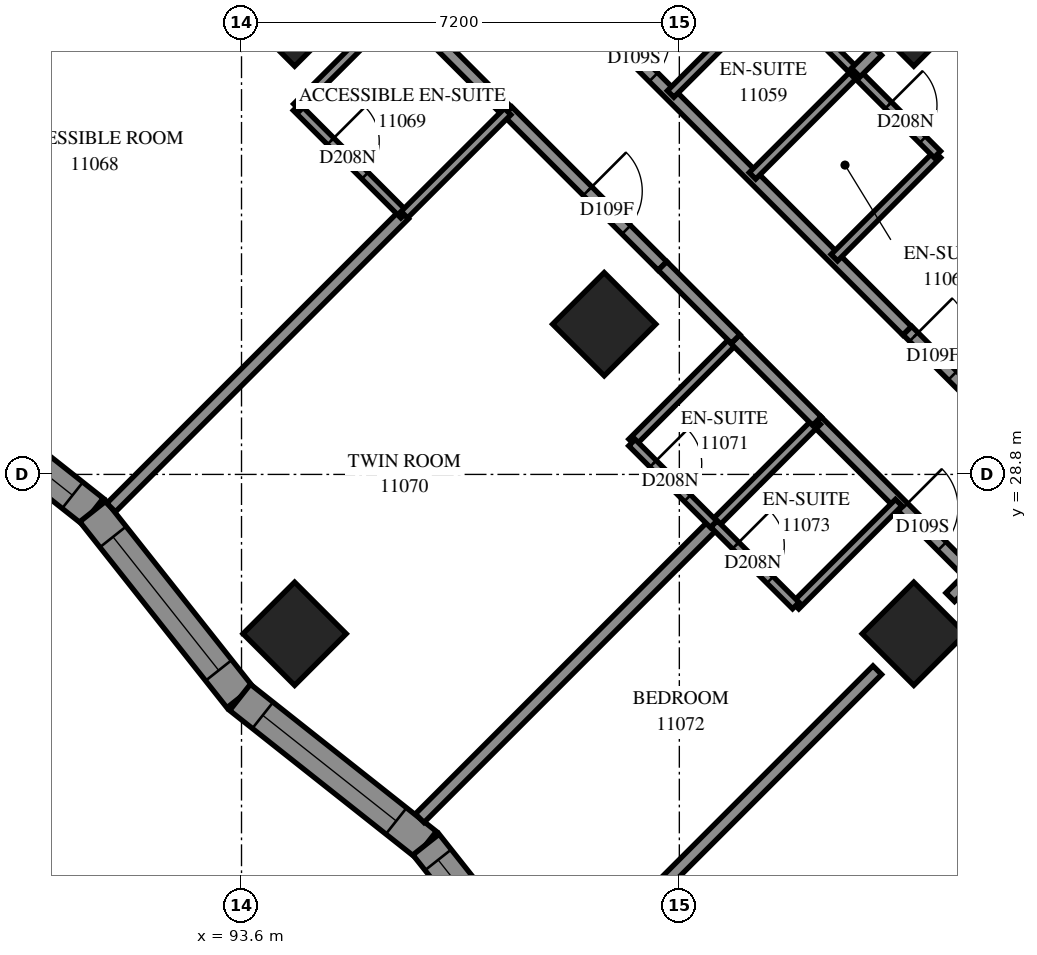
"""IFC4 building model, lengths in metres.
Left out: names, types, materials, properties, quantities, classifications, styles, units other than length and angle.
Written with IfcOpenShell. Run it as: python <this file> out.ifc"""

import sys

from ifc_helpers import new_model, si_unit, direction, frame, frame_2d, origin, origin_2d, place, context, subcontext, project, spatial, polyline, rectangle, outline, extrude, element, fill, save


model = new_model("IFC4")
c1 = context("Model", 3, precision=1e-05, world=origin(), true_north=direction((0.0, 1.0)))
c2 = subcontext(c1, "Body", "Model", "MODEL_VIEW")
j1 = project(units=[si_unit("LENGTHUNIT", "METRE"), si_unit("PLANEANGLEUNIT", "RADIAN")], contexts=[c1])
p1 = place(None, origin())
s1 = spatial("IfcSite", under=j1, at=p1, CompositionType="ELEMENT")
p2 = place(p1, origin())
s2 = spatial("IfcBuilding", under=s1, at=p2, CompositionType="ELEMENT")
p3 = place(p2, frame((0.0, 0.0, 44.0)))
s3 = spatial("IfcBuildingStorey", under=s2, at=p3, CompositionType="ELEMENT", Elevation=44.0)
for number, where, z_axis, x_axis in (
    (1, (94.474, 36.362, 0.0), (0.0, 0.0, 1.0), (0.707, -0.707, 0.0)),
    (2, (104.656, 36.362, 0.0), (0.0, 0.0, 1.0), (0.707, -0.707, 0.0)),
    (3, (99.565, 31.271, 0.0), (0.0, 0.0, 1.0), (0.707, -0.707, 0.0)),
    (4, (94.474, 26.18, 0.0), (0.0, 0.0, 1.0), (0.707, -0.707, 0.0)),
    (5, (104.656, 26.18, 0.0), (0.0, 0.0, 1.0), (0.707, -0.707, 0.0)),
):
    element("IfcColumn", number, at=place(p3, frame(where, z_axis=z_axis, x_axis=x_axis)), inside=s3, PredefinedType="COLUMN", context=c2, shape_type="SweptSolid", body=[
        extrude(rectangle(XDim=1.2, YDim=1.2, at=origin_2d()), origin(), (0.0, 0.0, 1.0), 3.1),
    ])
p4 = place(p3, frame((88.097, 30.612, 0.0), z_axis=(0.0, 0.0, 1.0), x_axis=(0.7841326465, -0.6205932587, 0.0)))
e6 = element("IfcWall", 6, at=p4, inside=s3, PredefinedType="SOLIDWALL", context=c2, shape_type="SweptSolid", body=[
    extrude(outline(polyline([(-0.032, -0.275), (3.868, -0.275), (3.932, 0.275), (0.032, 0.275), (-0.032, -0.275)])), origin(), (0.0, 0.0, 1.0), 3.1),
])
p5 = place(p4, frame((0.673, 0.0, 0.5)))
e7 = element("IfcOpeningElement", 7, at=p5, cuts=e6, PredefinedType="OPENING", context=c2, shape_type="SweptSolid", body=[
    extrude(rectangle(XDim=2.8, YDim=2.45, at=frame_2d((1.4, 1.225))), frame((0.0, 0.285, 0.0), z_axis=(0.0, -1.0, 0.0), x_axis=(1.0, 0.0, 0.0)), (0.0, 0.0, 1.0), 0.57),
])
p6 = place(p3, frame((91.156, 28.192, 0.0), z_axis=(0.0, 0.0, 1.0), x_axis=(0.6205932587, -0.7841326465, 0.0)))
e8 = element("IfcWall", 8, at=p6, inside=s3, PredefinedType="SOLIDWALL", context=c2, shape_type="SweptSolid", body=[
    extrude(outline(polyline([(0.032, -0.275), (3.932, -0.275), (3.868, 0.275), (-0.032, 0.275), (0.032, -0.275)])), origin(), (0.0, 0.0, 1.0), 3.1),
])
p7 = place(p6, frame((0.534, 0.0, 0.5)))
e9 = element("IfcOpeningElement", 9, at=p7, cuts=e8, PredefinedType="OPENING", context=c2, shape_type="SweptSolid", body=[
    extrude(rectangle(XDim=2.8, YDim=2.45, at=frame_2d((1.4, 1.225))), frame((0.0, 0.285, 0.0), z_axis=(0.0, -1.0, 0.0), x_axis=(1.0, 0.0, 0.0)), (0.0, 0.0, 1.0), 0.57),
])
p8 = place(p3, frame((93.576, 25.134, 0.0), z_axis=(0.0, 0.0, 1.0), x_axis=(0.7841326465, -0.6205932587, 0.0)))
e10 = element("IfcWall", 10, at=p8, inside=s3, PredefinedType="SOLIDWALL", context=c2, shape_type="SweptSolid", body=[
    extrude(outline(polyline([(-0.032, -0.275), (3.868, -0.275), (3.932, 0.275), (0.032, 0.275), (-0.032, -0.275)])), origin(), (0.0, 0.0, 1.0), 3.1),
])
p9 = place(p8, frame((0.475, 0.0, 0.5)))
e11 = element("IfcOpeningElement", 11, at=p9, cuts=e10, PredefinedType="OPENING", context=c2, shape_type="SweptSolid", body=[
    extrude(rectangle(XDim=2.8, YDim=2.45, at=frame_2d((1.4, 1.225))), frame((0.0, 0.285, 0.0), z_axis=(0.0, -1.0, 0.0), x_axis=(1.0, 0.0, 0.0)), (0.0, 0.0, 1.0), 0.57),
])
p10 = place(p3, frame((96.634, 22.713, 0.0), z_axis=(0.0, 0.0, 1.0), x_axis=(0.6205932587, -0.7841326465, 0.0)))
e12 = element("IfcWall", 12, at=p10, inside=s3, PredefinedType="SOLIDWALL", context=c2, shape_type="SweptSolid", body=[
    extrude(outline(polyline([(0.032, -0.275), (3.932, -0.275), (3.868, 0.275), (-0.032, 0.275), (0.032, -0.275)])), origin(), (0.0, 0.0, 1.0), 3.1),
])
p11 = place(p10, frame((0.322, 0.0, 0.5)))
e13 = element("IfcOpeningElement", 13, at=p11, cuts=e12, PredefinedType="OPENING", context=c2, shape_type="SweptSolid", body=[
    extrude(rectangle(XDim=2.8, YDim=2.45, at=frame_2d((1.4, 1.225))), frame((0.0, 0.285, 0.0), z_axis=(0.0, -1.0, 0.0), x_axis=(1.0, 0.0, 0.0)), (0.0, 0.0, 1.0), 0.57),
])
p12 = place(p3, frame((103.061, 29.677, 0.0), z_axis=(0.0, 0.0, 1.0), x_axis=(0.7071067812, -0.7071067812, 0.0)))
e14 = element("IfcWall", 14, at=p12, inside=s3, PredefinedType="PARTITIONING", context=c2, shape_type="SweptSolid", body=[
    extrude(rectangle(XDim=10.802, YDim=0.2, at=frame_2d((5.401, 0.0))), origin(), (0.0, 0.0, 1.0), 3.1),
])
p13 = place(p12, frame((2.012, 0.0, 0.0)))
e15 = element("IfcOpeningElement", 15, at=p13, cuts=e14, PredefinedType="OPENING", context=c2, shape_type="SweptSolid", body=[
    extrude(rectangle(XDim=0.9, YDim=2.1, at=frame_2d((0.45, 1.05))), frame((0.0, 0.11, 0.0), z_axis=(0.0, -1.0, 0.0), x_axis=(1.0, 0.0, 0.0)), (0.0, 0.0, 1.0), 0.22),
])
p14 = place(p12, frame((7.463, 0.0, 0.0)))
e16 = element("IfcOpeningElement", 16, at=p14, cuts=e14, PredefinedType="OPENING", context=c2, shape_type="SweptSolid", body=[
    extrude(rectangle(XDim=1.0, YDim=2.1, at=frame_2d((0.5, 1.05))), frame((0.0, 0.11, 0.0), z_axis=(0.0, -1.0, 0.0), x_axis=(1.0, 0.0, 0.0)), (0.0, 0.0, 1.0), 0.22),
])
p15 = place(p3, frame((86.324, 33.296, 0.0), z_axis=(0.0, 0.0, 1.0), x_axis=(0.7069990152, 0.7072145308, 0.0)))
e17 = element("IfcWall", 17, at=p15, inside=s3, PredefinedType="PARTITIONING", context=c2, shape_type="SweptSolid", body=[
    extrude(rectangle(XDim=9.28, YDim=0.2, at=frame_2d((4.64, 0.0))), origin(), (0.0, 0.0, 1.0), 3.1),
])
p16 = place(p3, frame((92.243, 40.495, 0.0), z_axis=(0.0, 0.0, 1.0), x_axis=(0.7071067812, -0.7071067812, 0.0)))
e18 = element("IfcWall", 18, at=p16, inside=s3, PredefinedType="PARTITIONING", context=c2, shape_type="SweptSolid", body=[
    extrude(rectangle(XDim=8.101, YDim=0.2, at=frame_2d((4.05, 0.0))), origin(), (0.0, 0.0, 1.0), 3.1),
])
p17 = place(p16, frame((2.75, 0.0, 0.0)))
e19 = element("IfcOpeningElement", 19, at=p17, cuts=e18, PredefinedType="OPENING", context=c2, shape_type="SweptSolid", body=[
    extrude(rectangle(XDim=0.9, YDim=2.1, at=frame_2d((0.45, 1.05))), frame((0.0, 0.11, 0.0), z_axis=(0.0, -1.0, 0.0), x_axis=(1.0, 0.0, 0.0)), (0.0, 0.0, 1.0), 0.22),
])
p18 = place(p3, frame((86.836, 35.372, 0.0), z_axis=(0.0, 0.0, 1.0), x_axis=(0.7071067812, 0.7071067812, 0.0)))
e20 = element("IfcWall", 20, at=p18, inside=s3, PredefinedType="PARTITIONING", context=c2, shape_type="SweptSolid", body=[
    extrude(rectangle(XDim=7.45, YDim=0.2, at=frame_2d((3.725, 0.0))), origin(), (0.0, 0.0, 1.0), 3.1),
])
p19 = place(p18, frame((6.192, 0.0, 0.0)))
e21 = element("IfcOpeningElement", 21, at=p19, cuts=e20, PredefinedType="OPENING", context=c2, shape_type="SweptSolid", body=[
    extrude(rectangle(XDim=1.0, YDim=2.1, at=frame_2d((0.5, 1.05))), frame((0.0, 0.11, 0.0), z_axis=(0.0, -1.0, 0.0), x_axis=(1.0, 0.0, 0.0)), (0.0, 0.0, 1.0), 0.22),
])
p20 = place(p3, frame((99.455, 36.253, 0.0), z_axis=(0.0, 0.0, 1.0), x_axis=(0.7071067812, -0.7071067812, 0.0)))
e22 = element("IfcWall", 22, at=p20, inside=s3, PredefinedType="PARTITIONING", context=c2, shape_type="SweptSolid", body=[
    extrude(rectangle(XDim=7.201, YDim=0.2, at=frame_2d((3.601, 0.0))), origin(), (0.0, 0.0, 1.0), 3.1),
])
p21 = place(p20, frame((0.401, 0.0, 0.0)))
e23 = element("IfcOpeningElement", 23, at=p21, cuts=e22, PredefinedType="OPENING", context=c2, shape_type="SweptSolid", body=[
    extrude(rectangle(XDim=0.9, YDim=2.1, at=frame_2d((0.45, 1.05))), frame((0.0, 0.11, 0.0), z_axis=(0.0, -1.0, 0.0), x_axis=(1.0, 0.0, 0.0)), (0.0, 0.0, 1.0), 0.22),
])
p22 = place(p3, frame((96.53, 23.146, 0.0), z_axis=(0.0, 0.0, 1.0), x_axis=(0.7071140909, 0.7070994714, 0.0)))
e24 = element("IfcWall", 24, at=p22, inside=s3, PredefinedType="PARTITIONING", context=c2, shape_type="SweptSolid", body=[
    extrude(rectangle(XDim=6.84, YDim=0.2, at=frame_2d((3.42, 0.0))), origin(), (0.0, 0.0, 1.0), 3.1),
])
p23 = place(p3, frame((91.456, 28.255, 0.0), z_axis=(0.0, 0.0, 1.0), x_axis=(0.7071067812, 0.7071067812, 0.0)))
e25 = element("IfcWall", 25, at=p23, inside=s3, PredefinedType="PARTITIONING", context=c2, shape_type="SweptSolid", body=[
    extrude(rectangle(XDim=6.816, YDim=0.2, at=frame_2d((3.408, 0.0))), origin(), (0.0, 0.0, 1.0), 3.1),
])
p24 = place(p3, frame((100.163, 21.689, 0.0), z_axis=(0.0, 0.0, 1.0), x_axis=(0.7071067812, 0.7071067812, 0.0)))
e26 = element("IfcWall", 26, at=p24, inside=s3, PredefinedType="PARTITIONING", context=c2, shape_type="SweptSolid", body=[
    extrude(rectangle(XDim=5.504, YDim=0.2, at=frame_2d((2.752, 0.0))), origin(), (0.0, 0.0, 1.0), 3.1),
])
p25 = place(p3, frame((97.976, 34.772, 0.0), z_axis=(0.0, 0.0, 1.0), x_axis=(0.7073845681, -0.7068288851, 0.0)))
e27 = element("IfcWall", 27, at=p25, inside=s3, PredefinedType="PARTITIONING", context=c2, shape_type="SweptSolid", body=[
    extrude(rectangle(XDim=3.599, YDim=0.2, at=frame_2d((1.8, 0.0))), origin(), (0.0, 0.0, 1.0), 3.1),
])
p26 = place(p25, frame((1.858, 0.0, 0.0)))
e28 = element("IfcOpeningElement", 28, at=p26, cuts=e27, PredefinedType="OPENING", context=c2, shape_type="SweptSolid", body=[
    extrude(rectangle(XDim=0.9, YDim=2.1, at=frame_2d((0.45, 1.05))), frame((0.0, 0.11, 0.0), z_axis=(0.0, -1.0, 0.0), x_axis=(1.0, 0.0, 0.0)), (0.0, 0.0, 1.0), 0.22),
])
p27 = place(p3, frame((104.551, 31.165, 0.0), z_axis=(0.0, 0.0, 1.0), x_axis=(0.7074545101, -0.7067588812, 0.0)))
e29 = element("IfcWall", 29, at=p27, inside=s3, PredefinedType="PARTITIONING", context=c2, shape_type="SweptSolid", body=[
    extrude(rectangle(XDim=2.875, YDim=0.2, at=frame_2d((1.438, 0.0))), origin(), (0.0, 0.0, 1.0), 3.1),
])
p28 = place(p27, frame((0.148, 0.0, 0.0)))
e30 = element("IfcOpeningElement", 30, at=p28, cuts=e29, PredefinedType="OPENING", context=c2, shape_type="SweptSolid", body=[
    extrude(rectangle(XDim=0.9, YDim=2.1, at=frame_2d((0.45, 1.05))), frame((0.0, 0.11, 0.0), z_axis=(0.0, -1.0, 0.0), x_axis=(1.0, 0.0, 0.0)), (0.0, 0.0, 1.0), 0.22),
])
p29 = place(p3, frame((94.505, 34.839, 0.0), z_axis=(0.0, 0.0, 1.0), x_axis=(0.7071067812, -0.7071067812, 0.0)))
e31 = element("IfcWall", 31, at=p29, inside=s3, PredefinedType="PARTITIONING", context=c2, shape_type="SweptSolid", body=[
    extrude(rectangle(XDim=2.5, YDim=0.15, at=frame_2d((1.25, 0.0))), origin(), (0.0, 0.0, 1.0), 3.1),
])
p30 = place(p29, frame((0.792, 0.0, 0.0)))
e32 = element("IfcOpeningElement", 32, at=p30, cuts=e31, PredefinedType="OPENING", context=c2, shape_type="SweptSolid", body=[
    extrude(rectangle(XDim=0.8, YDim=2.1, at=frame_2d((0.4, 1.05))), frame((0.0, 0.085, 0.0), z_axis=(0.0, -1.0, 0.0), x_axis=(1.0, 0.0, 0.0)), (0.0, 0.0, 1.0), 0.17),
])
for number, where, z_axis, x_axis in (
    (33, (102.003, 33.711, 0.0), (0.0, 0.0, 1.0), (0.707, 0.707, 0.0)),
    (34, (100.023, 29.327, 0.0), (0.0, 0.0, 1.0), (0.707, 0.707, 0.0)),
):
    element("IfcWall", number, at=place(p3, frame(where, z_axis=z_axis, x_axis=x_axis)), inside=s3, PredefinedType="PARTITIONING", context=c2, shape_type="SweptSolid", body=[
        extrude(rectangle(XDim=2.401, YDim=0.15, at=frame_2d((1.201, 0.0))), origin(), (0.0, 0.0, 1.0), 3.1),
    ])
for number, where, z_axis, x_axis in (
    (35, (96.278, 33.072, 0.0), (0.0, 0.0, 1.0), (0.708, 0.707, 0.0)),
    (36, (94.511, 34.839, 0.0), (0.0, 0.0, 1.0), (0.708, 0.707, 0.0)),
    (37, (100.657, 35.057, 0.0), (0.0, 0.0, 1.0), (0.708, 0.707, 0.0)),
    (38, (101.371, 27.979, 0.0), (0.0, 0.0, 1.0), (0.707, 0.708, 0.0)),
    (39, (103.349, 32.365, 0.0), (0.0, 0.0, 1.0), (0.707, 0.708, 0.0)),
):
    element("IfcWall", number, at=place(p3, frame(where, z_axis=z_axis, x_axis=x_axis)), inside=s3, PredefinedType="PARTITIONING", context=c2, shape_type="SweptSolid", body=[
        extrude(rectangle(XDim=2.4, YDim=0.15, at=frame_2d((1.2, 0.0))), origin(), (0.0, 0.0, 1.0), 3.1),
    ])
p31 = place(p3, frame((102.711, 26.641, 0.0), z_axis=(0.0, 0.0, 1.0), x_axis=(0.7071067812, 0.7071067812, 0.0)))
e40 = element("IfcWall", 40, at=p31, inside=s3, PredefinedType="PARTITIONING", context=c2, shape_type="SweptSolid", body=[
    extrude(rectangle(XDim=2.398, YDim=0.15, at=frame_2d((1.199, 0.0))), origin(), (0.0, 0.0, 1.0), 3.1),
])
p32 = place(p3, frame((100.021, 29.323, 0.0), z_axis=(0.0, 0.0, 1.0), x_axis=(0.7071067812, -0.7071067812, 0.0)))
e41 = element("IfcWall", 41, at=p32, inside=s3, PredefinedType="PARTITIONING", context=c2, shape_type="SweptSolid", body=[
    extrude(rectangle(XDim=1.901, YDim=0.15, at=frame_2d((0.95, 0.0))), origin(), (0.0, 0.0, 1.0), 3.1),
])
p33 = place(p32, frame((0.491, 0.0, 0.0)))
e42 = element("IfcOpeningElement", 42, at=p33, cuts=e41, PredefinedType="OPENING", context=c2, shape_type="SweptSolid", body=[
    extrude(rectangle(XDim=0.8, YDim=2.1, at=frame_2d((0.4, 1.05))), frame((0.0, 0.085, 0.0), z_axis=(0.0, -1.0, 0.0), x_axis=(1.0, 0.0, 0.0)), (0.0, 0.0, 1.0), 0.17),
])
p34 = place(p3, frame((101.371, 27.985, 0.0), z_axis=(0.0, 0.0, 1.0), x_axis=(0.7076330979, -0.7065800724, 0.0)))
e43 = element("IfcWall", 43, at=p34, inside=s3, PredefinedType="PARTITIONING", context=c2, shape_type="SweptSolid", body=[
    extrude(rectangle(XDim=1.899, YDim=0.15, at=frame_2d((0.95, 0.0))), origin(), (0.0, 0.0, 1.0), 3.1),
])
p35 = place(p34, frame((0.501, 0.0, 0.0)))
e44 = element("IfcOpeningElement", 44, at=p35, cuts=e43, PredefinedType="OPENING", context=c2, shape_type="SweptSolid", body=[
    extrude(rectangle(XDim=0.8, YDim=2.1, at=frame_2d((0.4, 1.05))), frame((0.0, 0.085, 0.0), z_axis=(0.0, -1.0, 0.0), x_axis=(1.0, 0.0, 0.0)), (0.0, 0.0, 1.0), 0.17),
])
p36 = place(p3, frame((103.701, 35.407, 0.0), z_axis=(0.0, 0.0, 1.0), x_axis=(0.7065800724, -0.7076330979, 0.0)))
e45 = element("IfcWall", 45, at=p36, inside=s3, PredefinedType="PARTITIONING", context=c2, shape_type="SweptSolid", body=[
    extrude(rectangle(XDim=1.899, YDim=0.15, at=frame_2d((0.95, 0.0))), origin(), (0.0, 0.0, 1.0), 3.1),
])
p37 = place(p36, frame((0.759, 0.0, 0.0)))
e46 = element("IfcOpeningElement", 46, at=p37, cuts=e45, PredefinedType="OPENING", context=c2, shape_type="SweptSolid", body=[
    extrude(rectangle(XDim=0.8, YDim=2.1, at=frame_2d((0.4, 1.05))), frame((0.0, 0.085, 0.0), z_axis=(0.0, -1.0, 0.0), x_axis=(1.0, 0.0, 0.0)), (0.0, 0.0, 1.0), 0.17),
])
p38 = place(p3, frame((101.72, 31.022, 0.0), z_axis=(0.0, 0.0, 1.0), x_axis=(0.7065800724, -0.7076330979, 0.0)))
e47 = element("IfcWall", 47, at=p38, inside=s3, PredefinedType="PARTITIONING", context=c2, shape_type="SweptSolid", body=[
    extrude(rectangle(XDim=1.899, YDim=0.2, at=frame_2d((0.95, 0.0))), origin(), (0.0, 0.0, 1.0), 3.1),
])
p39 = place(p3, frame((102.358, 36.75, 0.0), z_axis=(0.0, 0.0, 1.0), x_axis=(0.7076330979, -0.7065800724, 0.0)))
e48 = element("IfcWall", 48, at=p39, inside=s3, PredefinedType="PARTITIONING", context=c2, shape_type="SweptSolid", body=[
    extrude(rectangle(XDim=1.899, YDim=0.15, at=frame_2d((0.95, 0.0))), origin(), (0.0, 0.0, 1.0), 3.1),
])
p40 = place(p39, frame((0.296, 0.0, 0.0)))
e49 = element("IfcOpeningElement", 49, at=p40, cuts=e48, PredefinedType="OPENING", context=c2, shape_type="SweptSolid", body=[
    extrude(rectangle(XDim=0.8, YDim=2.1, at=frame_2d((0.4, 1.05))), frame((0.0, 0.085, 0.0), z_axis=(0.0, -1.0, 0.0), x_axis=(1.0, 0.0, 0.0)), (0.0, 0.0, 1.0), 0.17),
])
p41 = place(p3, frame((100.523, 32.229, 0.0), z_axis=(0.0, 0.0, 1.0), x_axis=(0.7071067812, -0.7071067812, 0.0)))
e50 = element("IfcWall", 50, at=p41, inside=s3, PredefinedType="PARTITIONING", context=c2, shape_type="SweptSolid", body=[
    extrude(rectangle(XDim=1.7, YDim=0.2, at=frame_2d((0.85, 0.0))), origin(), (0.0, 0.0, 1.0), 3.1),
])
for number, where, z_axis, x_axis in (
    (51, (105.255, 26.781, 0.0), (0.0, 0.0, 1.0), (0.707, 0.707, 0.0)),
    (52, (103.701, 35.409, 0.0), (0.0, 0.0, 1.0), (0.707, 0.707, 0.0)),
):
    element("IfcWall", number, at=place(p3, frame(where, z_axis=z_axis, x_axis=x_axis)), inside=s3, PredefinedType="PARTITIONING", context=c2, shape_type="SweptSolid", body=[
        extrude(rectangle(XDim=0.501, YDim=0.2, at=frame_2d((0.25, 0.0))), origin(), (0.0, 0.0, 1.0), 3.1),
    ])
p42 = place(p5, origin())
e53 = element("IfcWindow", 53, at=p42, inside=s3, PartitioningType="SINGLE_PANEL", PredefinedType="WINDOW", context=c2, shape_type="SweptSolid", body=[
    extrude(rectangle(XDim=2.8, YDim=2.45, at=frame_2d((1.4, 1.225))), frame((0.0, 0.155, 0.0), z_axis=(0.0, -1.0, 0.0), x_axis=(1.0, 0.0, 0.0)), (0.0, 0.0, 1.0), 0.06),
])
fill(e7, e53)
p43 = place(p7, origin())
e54 = element("IfcWindow", 54, at=p43, inside=s3, PartitioningType="SINGLE_PANEL", PredefinedType="WINDOW", context=c2, shape_type="SweptSolid", body=[
    extrude(rectangle(XDim=2.8, YDim=2.45, at=frame_2d((1.4, 1.225))), frame((0.0, 0.155, 0.0), z_axis=(0.0, -1.0, 0.0), x_axis=(1.0, 0.0, 0.0)), (0.0, 0.0, 1.0), 0.06),
])
fill(e9, e54)
p44 = place(p9, origin())
e55 = element("IfcWindow", 55, at=p44, inside=s3, PartitioningType="SINGLE_PANEL", PredefinedType="WINDOW", context=c2, shape_type="SweptSolid", body=[
    extrude(rectangle(XDim=2.8, YDim=2.45, at=frame_2d((1.4, 1.225))), frame((0.0, 0.155, 0.0), z_axis=(0.0, -1.0, 0.0), x_axis=(1.0, 0.0, 0.0)), (0.0, 0.0, 1.0), 0.06),
])
fill(e11, e55)
p45 = place(p11, origin())
e56 = element("IfcWindow", 56, at=p45, inside=s3, PartitioningType="SINGLE_PANEL", PredefinedType="WINDOW", context=c2, shape_type="SweptSolid", body=[
    extrude(rectangle(XDim=2.8, YDim=2.45, at=frame_2d((1.4, 1.225))), frame((0.0, 0.155, 0.0), z_axis=(0.0, -1.0, 0.0), x_axis=(1.0, 0.0, 0.0)), (0.0, 0.0, 1.0), 0.06),
])
fill(e13, e56)
p46 = place(p21, origin())
e57 = element("IfcDoor", 57, at=p46, inside=s3, OperationType="SINGLE_SWING_RIGHT", PredefinedType="DOOR", context=c2, shape_type="SweptSolid", body=[
    extrude(rectangle(XDim=0.9, YDim=2.1, at=frame_2d((0.45, 1.05))), frame((0.0, 0.025, 0.0), z_axis=(0.0, -1.0, 0.0), x_axis=(1.0, 0.0, 0.0)), (0.0, 0.0, 1.0), 0.05),
])
fill(e23, e57)
p47 = place(p28, origin())
e58 = element("IfcDoor", 58, at=p47, inside=s3, OperationType="SINGLE_SWING_LEFT", PredefinedType="DOOR", context=c2, shape_type="SweptSolid", body=[
    extrude(rectangle(XDim=0.9, YDim=2.1, at=frame_2d((0.45, 1.05))), frame((0.0, 0.025, 0.0), z_axis=(0.0, -1.0, 0.0), x_axis=(1.0, 0.0, 0.0)), (0.0, 0.0, 1.0), 0.05),
])
fill(e30, e58)
p48 = place(p37, origin())
e59 = element("IfcDoor", 59, at=p48, inside=s3, OperationType="SINGLE_SWING_RIGHT", PredefinedType="DOOR", context=c2, shape_type="SweptSolid", body=[
    extrude(rectangle(XDim=0.8, YDim=2.1, at=frame_2d((0.4, 1.05))), frame((0.0, 0.025, 0.0), z_axis=(0.0, -1.0, 0.0), x_axis=(1.0, 0.0, 0.0)), (0.0, 0.0, 1.0), 0.05),
])
fill(e46, e59)
p49 = place(p30, origin())
e60 = element("IfcDoor", 60, at=p49, inside=s3, OperationType="SINGLE_SWING_RIGHT", PredefinedType="DOOR", context=c2, shape_type="SweptSolid", body=[
    extrude(rectangle(XDim=0.8, YDim=2.1, at=frame_2d((0.4, 1.05))), frame((0.0, 0.025, 0.0), z_axis=(0.0, -1.0, 0.0), x_axis=(1.0, 0.0, 0.0)), (0.0, 0.0, 1.0), 0.05),
])
fill(e32, e60)
p50 = place(p26, origin())
e61 = element("IfcDoor", 61, at=p50, inside=s3, OperationType="SINGLE_SWING_LEFT", PredefinedType="DOOR", context=c2, shape_type="SweptSolid", body=[
    extrude(rectangle(XDim=0.9, YDim=2.1, at=frame_2d((0.45, 1.05))), frame((0.0, 0.025, 0.0), z_axis=(0.0, -1.0, 0.0), x_axis=(1.0, 0.0, 0.0)), (0.0, 0.0, 1.0), 0.05),
])
fill(e28, e61)
p51 = place(p33, origin())
e62 = element("IfcDoor", 62, at=p51, inside=s3, OperationType="SINGLE_SWING_RIGHT", PredefinedType="DOOR", context=c2, shape_type="SweptSolid", body=[
    extrude(rectangle(XDim=0.8, YDim=2.1, at=frame_2d((0.4, 1.05))), frame((0.0, 0.025, 0.0), z_axis=(0.0, -1.0, 0.0), x_axis=(1.0, 0.0, 0.0)), (0.0, 0.0, 1.0), 0.05),
])
fill(e42, e62)
p52 = place(p13, origin())
e63 = element("IfcDoor", 63, at=p52, inside=s3, OperationType="SINGLE_SWING_LEFT", PredefinedType="DOOR", context=c2, shape_type="SweptSolid", body=[
    extrude(rectangle(XDim=0.9, YDim=2.1, at=frame_2d((0.45, 1.05))), frame((0.0, 0.025, 0.0), z_axis=(0.0, -1.0, 0.0), x_axis=(1.0, 0.0, 0.0)), (0.0, 0.0, 1.0), 0.05),
])
fill(e15, e63)
p53 = place(p35, origin())
e64 = element("IfcDoor", 64, at=p53, inside=s3, OperationType="SINGLE_SWING_RIGHT", PredefinedType="DOOR", context=c2, shape_type="SweptSolid", body=[
    extrude(rectangle(XDim=0.8, YDim=2.1, at=frame_2d((0.4, 1.05))), frame((0.0, 0.025, 0.0), z_axis=(0.0, -1.0, 0.0), x_axis=(1.0, 0.0, 0.0)), (0.0, 0.0, 1.0), 0.05),
])
fill(e44, e64)
save(model, sys.argv[1])
